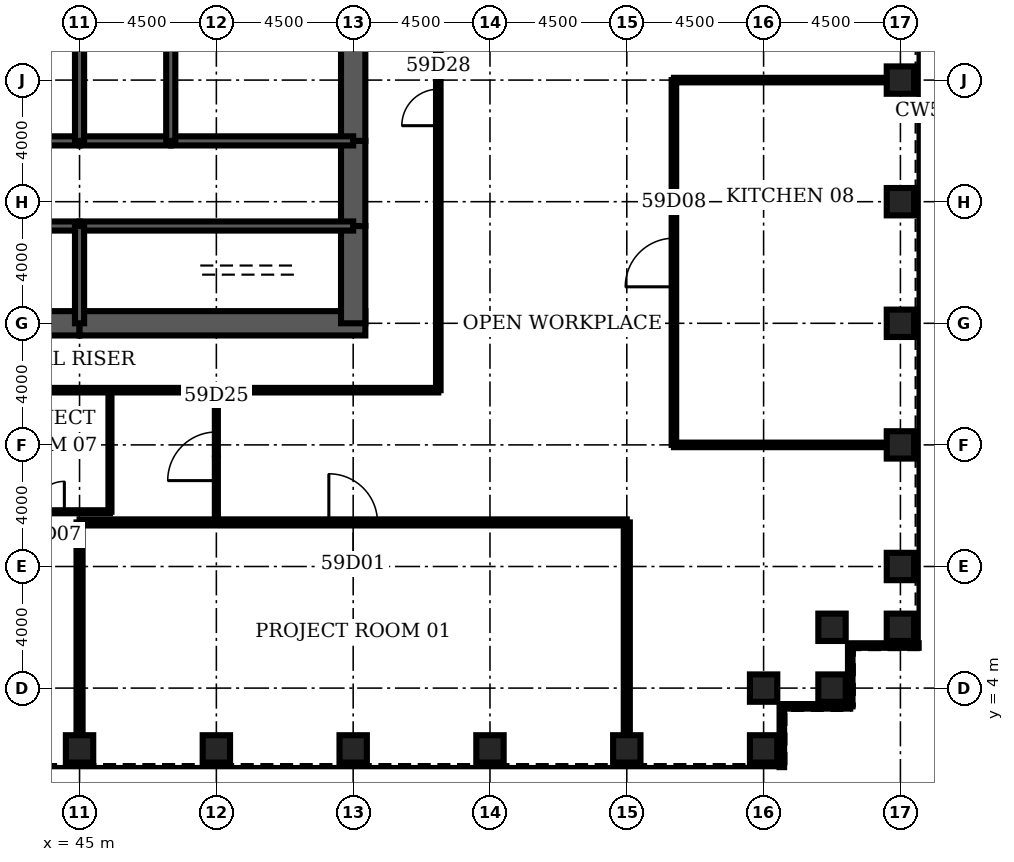
"""IFC4 building model, lengths in metres.
Left out: names, types, materials, properties, quantities, classifications, styles, units other than length and angle.
Written with IfcOpenShell. Run it as: python <this file> out.ifc"""

import sys

from ifc_helpers import new_model, si_unit, direction, frame, frame_2d, origin, origin_2d, place, context, subcontext, project, spatial, rectangle, hollow_rectangle, extrude, element, fill, save


model = new_model("IFC4")
c1 = context("Model", 3, precision=1e-05, world=origin(), true_north=direction((0.0, 1.0)))
c2 = subcontext(c1, "Body", "Model", "MODEL_VIEW")
j1 = project(units=[si_unit("LENGTHUNIT", "METRE"), si_unit("PLANEANGLEUNIT", "RADIAN")], contexts=[c1])
p1 = place(None, origin())
s1 = spatial("IfcSite", under=j1, at=p1, CompositionType="ELEMENT")
p2 = place(p1, origin())
s2 = spatial("IfcBuilding", under=s1, at=p2, CompositionType="ELEMENT")
p3 = place(p2, frame((0.0, 0.0, 261.4)))
s3 = spatial("IfcBuildingStorey", under=s2, at=p3, CompositionType="ELEMENT", Elevation=261.4)
for number, where, z_axis, x_axis in (
    (1, (45.0, 2.0, 0.0), (0.0, 0.0, 1.0), (0.0, 1.0, 0.0)),
    (2, (49.5, 2.0, 0.0), (0.0, 0.0, 1.0), (0.0, 1.0, 0.0)),
    (3, (54.0, 2.0, 0.0), (0.0, 0.0, 1.0), (0.0, 1.0, 0.0)),
    (4, (58.5, 2.0, 0.0), (0.0, 0.0, 1.0), (0.0, 1.0, 0.0)),
    (5, (63.0, 2.0, 0.0), (0.0, 0.0, 1.0), (0.0, 1.0, 0.0)),
    (6, (67.5, 2.0, 0.0), (0.0, 0.0, 1.0), (0.0, 1.0, 0.0)),
    (7, (67.5, 4.0, 0.0), (0.0, 0.0, 1.0), (0.0, 1.0, 0.0)),
    (8, (69.75, 4.0, 0.0), (0.0, 0.0, 1.0), (1.0, 0.0, 0.0)),
    (9, (69.75, 6.0, 0.0), (0.0, 0.0, 1.0), (1.0, 0.0, 0.0)),
    (10, (72.0, 6.0, 0.0), (0.0, 0.0, 1.0), (1.0, 0.0, 0.0)),
    (11, (72.0, 8.0, 0.0), (0.0, 0.0, 1.0), (1.0, 0.0, 0.0)),
    (12, (72.0, 12.0, 0.0), (0.0, 0.0, 1.0), (1.0, 0.0, 0.0)),
    (13, (72.0, 16.0, 0.0), (0.0, 0.0, 1.0), (1.0, 0.0, 0.0)),
    (14, (72.0, 20.0, 0.0), (0.0, 0.0, 1.0), (1.0, 0.0, 0.0)),
    (15, (72.0, 24.0, 0.0), (0.0, 0.0, 1.0), (1.0, 0.0, 0.0)),
):
    element("IfcColumn", number, at=place(p3, frame(where, z_axis=z_axis, x_axis=x_axis)), inside=s3, PredefinedType="COLUMN", context=c2, shape_type="SweptSolid", body=[
        extrude(hollow_rectangle(XDim=0.9, YDim=0.9, WallThickness=0.07, at=origin_2d()), origin(), (0.0, 0.0, 1.0), 4.2),
    ])
p4 = place(p3, frame((42.0, 16.0, 0.0), z_axis=(0.0, 0.0, 1.0), x_axis=(1.0, 0.0, 0.0)))
e16 = element("IfcWall", 16, at=p4, inside=s3, PredefinedType="SHEAR", context=c2, shape_type="SweptSolid", body=[
    extrude(rectangle(XDim=3.0, YDim=0.8, at=frame_2d((1.5, 0.0))), origin(), (0.0, 0.0, 1.0), 4.2),
])
p5 = place(p3, frame((45.0, 16.0, 0.0), z_axis=(0.0, 0.0, 1.0), x_axis=(1.0, 0.0, 0.0)))
e17 = element("IfcWall", 17, at=p5, inside=s3, PredefinedType="SHEAR", context=c2, shape_type="SweptSolid", body=[
    extrude(rectangle(XDim=9.4, YDim=0.8, at=frame_2d((4.7, 0.0))), origin(), (0.0, 0.0, 1.0), 4.2),
])
p6 = place(p3, frame((54.0, 16.0, 0.0), z_axis=(0.0, 0.0, 1.0), x_axis=(0.0, 1.0, 0.0)))
e18 = element("IfcWall", 18, at=p6, inside=s3, PredefinedType="SHEAR", context=c2, shape_type="SweptSolid", body=[
    extrude(rectangle(XDim=3.2, YDim=0.8, at=frame_2d((1.6, 0.0))), origin(), (0.0, 0.0, 1.0), 4.2),
])
p7 = place(p3, frame((54.0, 19.2, 0.0), z_axis=(0.0, 0.0, 1.0), x_axis=(0.0, 1.0, 0.0)))
e19 = element("IfcWall", 19, at=p7, inside=s3, PredefinedType="SHEAR", context=c2, shape_type="SweptSolid", body=[
    extrude(rectangle(XDim=2.8, YDim=0.8, at=frame_2d((1.4, 0.0))), origin(), (0.0, 0.0, 1.0), 4.2),
])
p8 = place(p7, frame((0.4, 0.0, 0.0)))
e20 = element("IfcOpeningElement", 20, at=p8, cuts=e19, PredefinedType="OPENING", context=c2, shape_type="SweptSolid", body=[
    extrude(rectangle(XDim=1.8, YDim=2.1, at=frame_2d((0.9, 1.05))), frame((0.0, 0.41, 0.0), z_axis=(0.0, -1.0, 0.0), x_axis=(1.0, 0.0, 0.0)), (0.0, 0.0, 1.0), 0.82),
])
p9 = place(p3, frame((54.0, 22.0, 0.0), z_axis=(0.0, 0.0, 1.0), x_axis=(0.0, 1.0, 0.0)))
e21 = element("IfcWall", 21, at=p9, inside=s3, PredefinedType="SHEAR", context=c2, shape_type="SweptSolid", body=[
    extrude(rectangle(XDim=4.0, YDim=0.8, at=frame_2d((2.0, 0.0))), origin(), (0.0, 0.0, 1.0), 4.2),
])
p10 = place(p3, frame((42.0, 19.2, 0.0), z_axis=(0.0, 0.0, 1.0), x_axis=(1.0, 0.0, 0.0)))
e22 = element("IfcWall", 22, at=p10, inside=s3, PredefinedType="SOLIDWALL", context=c2, shape_type="SweptSolid", body=[
    extrude(rectangle(XDim=3.0, YDim=0.3, at=frame_2d((1.5, 0.0))), origin(), (0.0, 0.0, 1.0), 4.2),
])
p11 = place(p10, frame((1.0, 0.0, 0.0)))
e23 = element("IfcOpeningElement", 23, at=p11, cuts=e22, PredefinedType="OPENING", context=c2, shape_type="SweptSolid", body=[
    extrude(rectangle(XDim=1.0, YDim=2.1, at=frame_2d((0.5, 1.05))), frame((0.0, 0.16, 0.0), z_axis=(0.0, -1.0, 0.0), x_axis=(1.0, 0.0, 0.0)), (0.0, 0.0, 1.0), 0.32),
])
p12 = place(p3, frame((45.0, 19.2, 0.0), z_axis=(0.0, 0.0, 1.0), x_axis=(1.0, 0.0, 0.0)))
e24 = element("IfcWall", 24, at=p12, inside=s3, PredefinedType="SOLIDWALL", context=c2, shape_type="SweptSolid", body=[
    extrude(rectangle(XDim=9.0, YDim=0.3, at=frame_2d((4.5, 0.0))), origin(), (0.0, 0.0, 1.0), 4.2),
])
p13 = place(p12, frame((7.35, 0.0, 0.0)))
e25 = element("IfcOpeningElement", 25, at=p13, cuts=e24, PredefinedType="OPENING", context=c2, shape_type="SweptSolid", body=[
    extrude(rectangle(XDim=1.0, YDim=2.1, at=frame_2d((0.5, 1.05))), frame((0.0, 0.16, 0.0), z_axis=(0.0, -1.0, 0.0), x_axis=(1.0, 0.0, 0.0)), (0.0, 0.0, 1.0), 0.32),
])
p14 = place(p3, frame((36.0, 22.0, 0.0), z_axis=(0.0, 0.0, 1.0), x_axis=(1.0, 0.0, 0.0)))
e26 = element("IfcWall", 26, at=p14, inside=s3, PredefinedType="SOLIDWALL", context=c2, shape_type="SweptSolid", body=[
    extrude(rectangle(XDim=9.0, YDim=0.3, at=frame_2d((4.5, 0.0))), origin(), (0.0, 0.0, 1.0), 4.2),
])
p15 = place(p14, frame((4.0, 0.0, 0.0)))
e27 = element("IfcOpeningElement", 27, at=p15, cuts=e26, PredefinedType="OPENING", context=c2, shape_type="SweptSolid", body=[
    extrude(rectangle(XDim=1.0, YDim=2.1, at=frame_2d((0.5, 1.05))), frame((0.0, 0.16, 0.0), z_axis=(0.0, -1.0, 0.0), x_axis=(1.0, 0.0, 0.0)), (0.0, 0.0, 1.0), 0.32),
])
p16 = place(p3, frame((45.0, 22.0, 0.0), z_axis=(0.0, 0.0, 1.0), x_axis=(1.0, 0.0, 0.0)))
e28 = element("IfcWall", 28, at=p16, inside=s3, PredefinedType="SOLIDWALL", context=c2, shape_type="SweptSolid", body=[
    extrude(rectangle(XDim=3.0, YDim=0.3, at=frame_2d((1.5, 0.0))), origin(), (0.0, 0.0, 1.0), 4.2),
])
p17 = place(p16, frame((1.0, 0.0, 0.0)))
e29 = element("IfcOpeningElement", 29, at=p17, cuts=e28, PredefinedType="OPENING", context=c2, shape_type="SweptSolid", body=[
    extrude(rectangle(XDim=1.0, YDim=2.1, at=frame_2d((0.5, 1.05))), frame((0.0, 0.16, 0.0), z_axis=(0.0, -1.0, 0.0), x_axis=(1.0, 0.0, 0.0)), (0.0, 0.0, 1.0), 0.32),
])
p18 = place(p3, frame((48.0, 22.0, 0.0), z_axis=(0.0, 0.0, 1.0), x_axis=(1.0, 0.0, 0.0)))
e30 = element("IfcWall", 30, at=p18, inside=s3, PredefinedType="SOLIDWALL", context=c2, shape_type="SweptSolid", body=[
    extrude(rectangle(XDim=6.0, YDim=0.3, at=frame_2d((3.0, 0.0))), origin(), (0.0, 0.0, 1.0), 4.2),
])
p19 = place(p18, frame((2.0, 0.0, 0.0)))
e31 = element("IfcOpeningElement", 31, at=p19, cuts=e30, PredefinedType="OPENING", context=c2, shape_type="SweptSolid", body=[
    extrude(rectangle(XDim=1.0, YDim=2.1, at=frame_2d((0.5, 1.05))), frame((0.0, 0.16, 0.0), z_axis=(0.0, -1.0, 0.0), x_axis=(1.0, 0.0, 0.0)), (0.0, 0.0, 1.0), 0.32),
])
p20 = place(p18, frame((4.05, 0.0, 0.0)))
e32 = element("IfcOpeningElement", 32, at=p20, cuts=e30, PredefinedType="OPENING", context=c2, shape_type="SweptSolid", body=[
    extrude(rectangle(XDim=1.0, YDim=2.1, at=frame_2d((0.5, 1.05))), frame((0.0, 0.16, 0.0), z_axis=(0.0, -1.0, 0.0), x_axis=(1.0, 0.0, 0.0)), (0.0, 0.0, 1.0), 0.32),
])
p21 = place(p3, frame((45.0, 16.0, 0.0), z_axis=(0.0, 0.0, 1.0), x_axis=(0.0, 1.0, 0.0)))
e33 = element("IfcWall", 33, at=p21, inside=s3, PredefinedType="SOLIDWALL", context=c2, shape_type="SweptSolid", body=[
    extrude(rectangle(XDim=3.2, YDim=0.3, at=frame_2d((1.6, 0.0))), origin(), (0.0, 0.0, 1.0), 4.2),
])
for number, where, z_axis, x_axis in (
    (34, (45.0, 22.0, 0.0), (0.0, 0.0, 1.0), (0.0, 1.0, 0.0)),
    (35, (48.0, 22.0, 0.0), (0.0, 0.0, 1.0), (0.0, 1.0, 0.0)),
):
    element("IfcWall", number, at=place(p3, frame(where, z_axis=z_axis, x_axis=x_axis)), inside=s3, PredefinedType="SOLIDWALL", context=c2, shape_type="SweptSolid", body=[
        extrude(rectangle(XDim=4.0, YDim=0.3, at=frame_2d((2.0, 0.0))), origin(), (0.0, 0.0, 1.0), 4.2),
    ])
p22 = place(p3, frame((42.15, 17.35, 0.0), z_axis=(0.0, 0.0, 1.0), x_axis=(1.0, 0.0, 0.0)))
e36 = element("IfcWall", 36, at=p22, inside=s3, PredefinedType="SOLIDWALL", context=c2, shape_type="SweptSolid", body=[
    extrude(rectangle(XDim=2.7, YDim=0.3, at=frame_2d((1.35, 0.0))), origin(), (0.0, 0.0, 1.0), 3.95),
])
p23 = place(p22, frame((0.85, 0.0, 0.0)))
e37 = element("IfcOpeningElement", 37, at=p23, cuts=e36, PredefinedType="OPENING", context=c2, shape_type="SweptSolid", body=[
    extrude(rectangle(XDim=1.0, YDim=2.1, at=frame_2d((0.5, 1.05))), frame((0.0, 0.16, 0.0), z_axis=(0.0, -1.0, 0.0), x_axis=(1.0, 0.0, 0.0)), (0.0, 0.0, 1.0), 0.32),
])
p24 = place(p3, frame((51.425, 22.15, 0.0), z_axis=(0.0, 0.0, 1.0), x_axis=(0.0, 1.0, 0.0)))
e38 = element("IfcWall", 38, at=p24, inside=s3, PredefinedType="PARTITIONING", context=c2, shape_type="SweptSolid", body=[
    extrude(rectangle(XDim=3.7, YDim=0.15, at=frame_2d((1.85, 0.0))), origin(), (0.0, 0.0, 1.0), 3.0),
])
p25 = place(p3, frame((45.0, 9.45, 0.0), z_axis=(0.0, 0.0, 1.0), x_axis=(1.0, 0.0, 0.0)))
e39 = element("IfcWall", 39, at=p25, inside=s3, PredefinedType="PARTITIONING", context=c2, shape_type="SweptSolid", body=[
    extrude(rectangle(XDim=18.0, YDim=0.2, at=frame_2d((9.0, 0.0))), origin(), (0.0, 0.0, 1.0), 3.0),
])
p26 = place(p25, frame((8.2, 0.0, 0.0)))
e40 = element("IfcOpeningElement", 40, at=p26, cuts=e39, PredefinedType="OPENING", context=c2, shape_type="SweptSolid", body=[
    extrude(rectangle(XDim=1.6, YDim=2.1, at=frame_2d((0.8, 1.05))), frame((0.0, 0.11, 0.0), z_axis=(0.0, -1.0, 0.0), x_axis=(1.0, 0.0, 0.0)), (0.0, 0.0, 1.0), 0.22),
])
p27 = place(p3, frame((22.0, 9.8, 0.0), z_axis=(0.0, 0.0, 1.0), x_axis=(1.0, 0.0, 0.0)))
e41 = element("IfcWall", 41, at=p27, inside=s3, PredefinedType="PARTITIONING", context=c2, shape_type="SweptSolid", body=[
    extrude(rectangle(XDim=24.0, YDim=0.1, at=frame_2d((12.0, 0.0))), origin(), (0.0, 0.0, 1.0), 3.0),
])
p28 = place(p27, frame((1.5, 0.0, 0.0)))
e42 = element("IfcOpeningElement", 42, at=p28, cuts=e41, PredefinedType="OPENING", context=c2, shape_type="SweptSolid", body=[
    extrude(rectangle(XDim=1.0, YDim=2.1, at=frame_2d((0.5, 1.05))), frame((0.0, 0.06, 0.0), z_axis=(0.0, -1.0, 0.0), x_axis=(1.0, 0.0, 0.0)), (0.0, 0.0, 1.0), 0.12),
])
p29 = place(p27, frame((5.5, 0.0, 0.0)))
e43 = element("IfcOpeningElement", 43, at=p29, cuts=e41, PredefinedType="OPENING", context=c2, shape_type="SweptSolid", body=[
    extrude(rectangle(XDim=1.0, YDim=2.1, at=frame_2d((0.5, 1.05))), frame((0.0, 0.06, 0.0), z_axis=(0.0, -1.0, 0.0), x_axis=(1.0, 0.0, 0.0)), (0.0, 0.0, 1.0), 0.12),
])
p30 = place(p27, frame((9.5, 0.0, 0.0)))
e44 = element("IfcOpeningElement", 44, at=p30, cuts=e41, PredefinedType="OPENING", context=c2, shape_type="SweptSolid", body=[
    extrude(rectangle(XDim=1.0, YDim=2.1, at=frame_2d((0.5, 1.05))), frame((0.0, 0.06, 0.0), z_axis=(0.0, -1.0, 0.0), x_axis=(1.0, 0.0, 0.0)), (0.0, 0.0, 1.0), 0.12),
])
p31 = place(p27, frame((13.5, 0.0, 0.0)))
e45 = element("IfcOpeningElement", 45, at=p31, cuts=e41, PredefinedType="OPENING", context=c2, shape_type="SweptSolid", body=[
    extrude(rectangle(XDim=1.0, YDim=2.1, at=frame_2d((0.5, 1.05))), frame((0.0, 0.06, 0.0), z_axis=(0.0, -1.0, 0.0), x_axis=(1.0, 0.0, 0.0)), (0.0, 0.0, 1.0), 0.12),
])
p32 = place(p27, frame((17.5, 0.0, 0.0)))
e46 = element("IfcOpeningElement", 46, at=p32, cuts=e41, PredefinedType="OPENING", context=c2, shape_type="SweptSolid", body=[
    extrude(rectangle(XDim=1.0, YDim=2.1, at=frame_2d((0.5, 1.05))), frame((0.0, 0.06, 0.0), z_axis=(0.0, -1.0, 0.0), x_axis=(1.0, 0.0, 0.0)), (0.0, 0.0, 1.0), 0.12),
])
p33 = place(p27, frame((21.5, 0.0, 0.0)))
e47 = element("IfcOpeningElement", 47, at=p33, cuts=e41, PredefinedType="OPENING", context=c2, shape_type="SweptSolid", body=[
    extrude(rectangle(XDim=1.0, YDim=2.1, at=frame_2d((0.5, 1.05))), frame((0.0, 0.06, 0.0), z_axis=(0.0, -1.0, 0.0), x_axis=(1.0, 0.0, 0.0)), (0.0, 0.0, 1.0), 0.12),
])
p34 = place(p3, frame((64.55, 12.0, 0.0), z_axis=(0.0, 0.0, 1.0), x_axis=(1.0, 0.0, 0.0)))
e48 = element("IfcWall", 48, at=p34, inside=s3, PredefinedType="PARTITIONING", context=c2, shape_type="SweptSolid", body=[
    extrude(rectangle(XDim=7.0, YDim=0.15, at=frame_2d((3.5, 0.0))), origin(), (0.0, 0.0, 1.0), 3.0),
])
p35 = place(p3, frame((15.2, 13.8, 0.0), z_axis=(0.0, 0.0, 1.0), x_axis=(1.0, 0.0, 0.0)))
e49 = element("IfcWall", 49, at=p35, inside=s3, PredefinedType="PARTITIONING", context=c2, shape_type="SweptSolid", body=[
    extrude(rectangle(XDim=41.6, YDim=0.15, at=frame_2d((20.8, 0.0))), origin(), (0.0, 0.0, 1.0), 3.0),
])
p36 = place(p35, frame((4.175, 0.0, 0.0)))
e50 = element("IfcOpeningElement", 50, at=p36, cuts=e49, PredefinedType="OPENING", context=c2, shape_type="SweptSolid", body=[
    extrude(rectangle(XDim=1.2, YDim=2.1, at=frame_2d((0.6, 1.05))), frame((0.0, 0.085, 0.0), z_axis=(0.0, -1.0, 0.0), x_axis=(1.0, 0.0, 0.0)), (0.0, 0.0, 1.0), 0.17),
])
p37 = place(p3, frame((64.55, 24.0, 0.0), z_axis=(0.0, 0.0, 1.0), x_axis=(1.0, 0.0, 0.0)))
e51 = element("IfcWall", 51, at=p37, inside=s3, PredefinedType="PARTITIONING", context=c2, shape_type="SweptSolid", body=[
    extrude(rectangle(XDim=7.0, YDim=0.15, at=frame_2d((3.5, 0.0))), origin(), (0.0, 0.0, 1.0), 3.0),
])
p38 = place(p3, frame((45.0, 2.45, 0.0), z_axis=(0.0, 0.0, 1.0), x_axis=(0.0, 1.0, 0.0)))
e52 = element("IfcWall", 52, at=p38, inside=s3, PredefinedType="PARTITIONING", context=c2, shape_type="SweptSolid", body=[
    extrude(rectangle(XDim=7.0, YDim=0.2, at=frame_2d((3.5, 0.0))), origin(), (0.0, 0.0, 1.0), 3.0),
])
p39 = place(p3, frame((46.0, 9.8, 0.0), z_axis=(0.0, 0.0, 1.0), x_axis=(0.0, 1.0, 0.0)))
e53 = element("IfcWall", 53, at=p39, inside=s3, PredefinedType="PARTITIONING", context=c2, shape_type="SweptSolid", body=[
    extrude(rectangle(XDim=4.0, YDim=0.1, at=frame_2d((2.0, 0.0))), origin(), (0.0, 0.0, 1.0), 2.942),
])
p40 = place(p3, frame((49.5, 9.45, 0.0), z_axis=(0.0, 0.0, 1.0), x_axis=(0.0, 1.0, 0.0)))
e54 = element("IfcWall", 54, at=p40, inside=s3, PredefinedType="PARTITIONING", context=c2, shape_type="SweptSolid", body=[
    extrude(rectangle(XDim=4.35, YDim=0.1, at=frame_2d((2.175, 0.0))), origin(), (0.0, 0.0, 1.0), 3.0),
])
p41 = place(p40, frame((1.375, 0.0, 0.0)))
e55 = element("IfcOpeningElement", 55, at=p41, cuts=e54, PredefinedType="OPENING", context=c2, shape_type="SweptSolid", body=[
    extrude(rectangle(XDim=1.6, YDim=2.1, at=frame_2d((0.8, 1.05))), frame((0.0, 0.06, 0.0), z_axis=(0.0, -1.0, 0.0), x_axis=(1.0, 0.0, 0.0)), (0.0, 0.0, 1.0), 0.12),
])
p42 = place(p3, frame((56.8, 13.8, 0.0), z_axis=(0.0, 0.0, 1.0), x_axis=(0.0, 1.0, 0.0)))
e56 = element("IfcWall", 56, at=p42, inside=s3, PredefinedType="PARTITIONING", context=c2, shape_type="SweptSolid", body=[
    extrude(rectangle(XDim=18.6, YDim=0.15, at=frame_2d((9.3, 0.0))), origin(), (0.0, 0.0, 1.0), 3.0),
])
p43 = place(p42, frame((8.7, 0.0, 0.0)))
e57 = element("IfcOpeningElement", 57, at=p43, cuts=e56, PredefinedType="OPENING", context=c2, shape_type="SweptSolid", body=[
    extrude(rectangle(XDim=1.2, YDim=2.1, at=frame_2d((0.6, 1.05))), frame((0.0, 0.085, 0.0), z_axis=(0.0, -1.0, 0.0), x_axis=(1.0, 0.0, 0.0)), (0.0, 0.0, 1.0), 0.17),
])
p44 = place(p3, frame((63.0, 2.45, 0.0), z_axis=(0.0, 0.0, 1.0), x_axis=(0.0, 1.0, 0.0)))
e58 = element("IfcWall", 58, at=p44, inside=s3, PredefinedType="PARTITIONING", context=c2, shape_type="SweptSolid", body=[
    extrude(rectangle(XDim=7.0, YDim=0.2, at=frame_2d((3.5, 0.0))), origin(), (0.0, 0.0, 1.0), 3.0),
])
p45 = place(p3, frame((64.55, 12.0, 0.0), z_axis=(0.0, 0.0, 1.0), x_axis=(0.0, 1.0, 0.0)))
e59 = element("IfcWall", 59, at=p45, inside=s3, PredefinedType="PARTITIONING", context=c2, shape_type="SweptSolid", body=[
    extrude(rectangle(XDim=12.0, YDim=0.15, at=frame_2d((6.0, 0.0))), origin(), (0.0, 0.0, 1.0), 3.0),
])
p46 = place(p45, frame((5.2, 0.0, 0.0)))
e60 = element("IfcOpeningElement", 60, at=p46, cuts=e59, PredefinedType="OPENING", context=c2, shape_type="SweptSolid", body=[
    extrude(rectangle(XDim=1.6, YDim=2.1, at=frame_2d((0.8, 1.05))), frame((0.0, 0.085, 0.0), z_axis=(0.0, -1.0, 0.0), x_axis=(1.0, 0.0, 0.0)), (0.0, 0.0, 1.0), 0.17),
])
p47 = place(p3, frame((68.1, 1.4, 0.0), z_axis=(0.0, 0.0, 1.0), x_axis=(0.0, 1.0, 0.0)))
e61 = element("IfcWall", 61, at=p47, inside=s3, PredefinedType="ELEMENTEDWALL", context=c2, shape_type="SweptSolid", body=[
    extrude(rectangle(XDim=2.0, YDim=0.15, at=frame_2d((1.0, 0.0))), origin(), (0.0, 0.0, 1.0), 3.95),
])
p48 = place(p3, frame((68.1, 3.4, 0.0), z_axis=(0.0, 0.0, 1.0), x_axis=(1.0, 0.0, 0.0)))
e62 = element("IfcWall", 62, at=p48, inside=s3, PredefinedType="ELEMENTEDWALL", context=c2, shape_type="SweptSolid", body=[
    extrude(rectangle(XDim=2.25, YDim=0.15, at=frame_2d((1.125, 0.0))), origin(), (0.0, 0.0, 1.0), 3.95),
])
p49 = place(p3, frame((70.35, 3.4, 0.0), z_axis=(0.0, 0.0, 1.0), x_axis=(0.0, 1.0, 0.0)))
e63 = element("IfcWall", 63, at=p49, inside=s3, PredefinedType="ELEMENTEDWALL", context=c2, shape_type="SweptSolid", body=[
    extrude(rectangle(XDim=2.0, YDim=0.15, at=frame_2d((1.0, 0.0))), origin(), (0.0, 0.0, 1.0), 3.95),
])
p50 = place(p3, frame((70.35, 5.4, 0.0), z_axis=(0.0, 0.0, 1.0), x_axis=(1.0, 0.0, 0.0)))
e64 = element("IfcWall", 64, at=p50, inside=s3, PredefinedType="ELEMENTEDWALL", context=c2, shape_type="SweptSolid", body=[
    extrude(rectangle(XDim=2.25, YDim=0.15, at=frame_2d((1.125, 0.0))), origin(), (0.0, 0.0, 1.0), 3.95),
])
p51 = place(p26, origin())
e65 = element("IfcDoor", 65, at=p51, inside=s3, OperationType="SINGLE_SWING_LEFT", PredefinedType="DOOR", context=c2, shape_type="SweptSolid", body=[
    extrude(rectangle(XDim=1.6, YDim=2.1, at=frame_2d((0.8, 1.05))), frame((0.0, 0.025, 0.0), z_axis=(0.0, -1.0, 0.0), x_axis=(1.0, 0.0, 0.0)), (0.0, 0.0, 1.0), 0.05),
])
fill(e40, e65)
p52 = place(p33, origin())
e66 = element("IfcDoor", 66, at=p52, inside=s3, OperationType="SINGLE_SWING_RIGHT", PredefinedType="DOOR", context=c2, shape_type="SweptSolid", body=[
    extrude(rectangle(XDim=1.0, YDim=2.1, at=frame_2d((0.5, 1.05))), frame((0.0, 0.025, 0.0), z_axis=(0.0, -1.0, 0.0), x_axis=(1.0, 0.0, 0.0)), (0.0, 0.0, 1.0), 0.05),
])
fill(e47, e66)
p53 = place(p46, origin())
e67 = element("IfcDoor", 67, at=p53, inside=s3, OperationType="SINGLE_SWING_LEFT", PredefinedType="DOOR", context=c2, shape_type="SweptSolid", body=[
    extrude(rectangle(XDim=1.6, YDim=2.1, at=frame_2d((0.8, 1.05))), frame((0.0, 0.025, 0.0), z_axis=(0.0, -1.0, 0.0), x_axis=(1.0, 0.0, 0.0)), (0.0, 0.0, 1.0), 0.05),
])
fill(e60, e67)
p54 = place(p41, origin())
e68 = element("IfcDoor", 68, at=p54, inside=s3, OperationType="SINGLE_SWING_LEFT", PredefinedType="DOOR", context=c2, shape_type="SweptSolid", body=[
    extrude(rectangle(XDim=1.6, YDim=2.1, at=frame_2d((0.8, 1.05))), frame((0.0, 0.025, 0.0), z_axis=(0.0, -1.0, 0.0), x_axis=(1.0, 0.0, 0.0)), (0.0, 0.0, 1.0), 0.05),
])
fill(e55, e68)
p55 = place(p43, origin())
e69 = element("IfcDoor", 69, at=p55, inside=s3, OperationType="SINGLE_SWING_LEFT", PredefinedType="DOOR", context=c2, shape_type="SweptSolid", body=[
    extrude(rectangle(XDim=1.2, YDim=2.1, at=frame_2d((0.6, 1.05))), frame((0.0, 0.025, 0.0), z_axis=(0.0, -1.0, 0.0), x_axis=(1.0, 0.0, 0.0)), (0.0, 0.0, 1.0), 0.05),
])
fill(e57, e69)
p56 = place(p13, origin())
e70 = element("IfcDoor", 70, at=p56, inside=s3, OperationType="SINGLE_SWING_RIGHT", PredefinedType="DOOR", context=c2, shape_type="SweptSolid", body=[
    extrude(rectangle(XDim=1.0, YDim=2.1, at=frame_2d((0.5, 1.05))), frame((0.0, 0.025, 0.0), z_axis=(0.0, -1.0, 0.0), x_axis=(1.0, 0.0, 0.0)), (0.0, 0.0, 1.0), 0.05),
])
fill(e25, e70)
p57 = place(p8, origin())
e71 = element("IfcDoor", 71, at=p57, inside=s3, OperationType="SINGLE_SWING_LEFT", PredefinedType="DOOR", context=c2, shape_type="SweptSolid", body=[
    extrude(rectangle(XDim=1.8, YDim=2.1, at=frame_2d((0.9, 1.05))), frame((0.0, 0.4, 0.0), z_axis=(0.0, -1.0, 0.0), x_axis=(1.0, 0.0, 0.0)), (0.0, 0.0, 1.0), 0.8),
])
fill(e20, e71)
p58 = place(p17, origin())
e72 = element("IfcDoor", 72, at=p58, inside=s3, OperationType="SINGLE_SWING_LEFT", PredefinedType="DOOR", context=c2, shape_type="SweptSolid", body=[
    extrude(rectangle(XDim=1.0, YDim=2.1, at=frame_2d((0.5, 1.05))), frame((0.0, 0.025, 0.0), z_axis=(0.0, -1.0, 0.0), x_axis=(1.0, 0.0, 0.0)), (0.0, 0.0, 1.0), 0.05),
])
fill(e29, e72)
p59 = place(p19, origin())
e73 = element("IfcDoor", 73, at=p59, inside=s3, OperationType="SINGLE_SWING_LEFT", PredefinedType="DOOR", context=c2, shape_type="SweptSolid", body=[
    extrude(rectangle(XDim=1.0, YDim=2.1, at=frame_2d((0.5, 1.05))), frame((0.0, 0.025, 0.0), z_axis=(0.0, -1.0, 0.0), x_axis=(1.0, 0.0, 0.0)), (0.0, 0.0, 1.0), 0.05),
])
fill(e31, e73)
p60 = place(p20, origin())
e74 = element("IfcDoor", 74, at=p60, inside=s3, OperationType="SINGLE_SWING_RIGHT", PredefinedType="DOOR", context=c2, shape_type="SweptSolid", body=[
    extrude(rectangle(XDim=1.0, YDim=2.1, at=frame_2d((0.5, 1.05))), frame((0.0, 0.025, 0.0), z_axis=(0.0, -1.0, 0.0), x_axis=(1.0, 0.0, 0.0)), (0.0, 0.0, 1.0), 0.05),
])
fill(e32, e74)
save(model, sys.argv[1])
